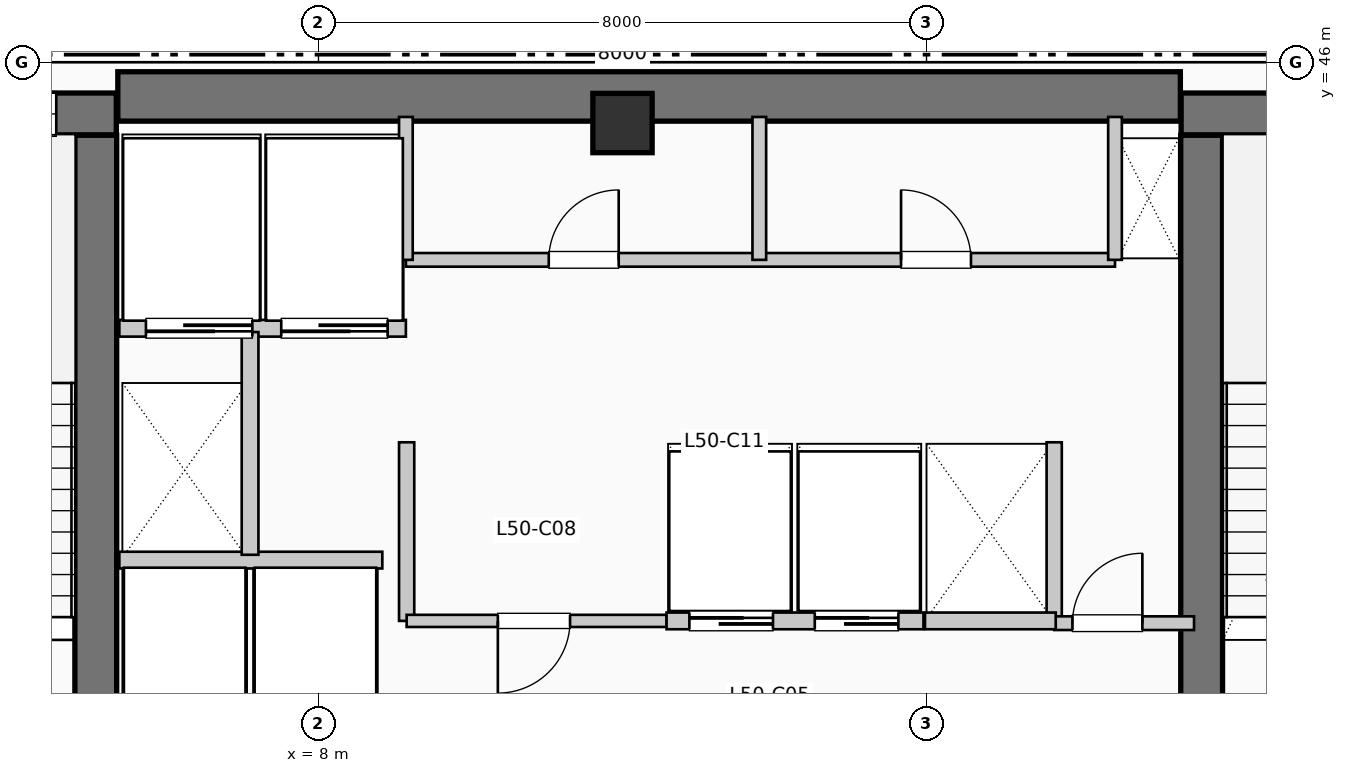
"""IFC4 building model, lengths in metres.
Left out: names, types, materials, properties, quantities, classifications, styles, units other than length and angle.
Written with IfcOpenShell. Run it as: python <this file> out.ifc"""

import sys

from ifc_helpers import new_model, si_unit, direction, frame, frame_2d, origin, origin_2d, place, context, subcontext, project, spatial, rectangle, extrude, element, fill, save


model = new_model("IFC4")
c1 = context("Model", 3, precision=1e-05, world=origin(), true_north=direction((0.0, 1.0)))
c2 = subcontext(c1, "Body", "Model", "MODEL_VIEW")
j1 = project(units=[si_unit("LENGTHUNIT", "METRE"), si_unit("PLANEANGLEUNIT", "RADIAN")], contexts=[c1])
p1 = place(None, origin())
s1 = spatial("IfcSite", under=j1, at=p1, CompositionType="ELEMENT")
p2 = place(p1, origin())
s2 = spatial("IfcBuilding", under=s1, at=p2, CompositionType="ELEMENT")
p3 = place(p2, frame((0.0, 0.0, 207.24)))
s3 = spatial("IfcBuildingStorey", under=s2, at=p3, CompositionType="ELEMENT", Elevation=207.24)
p4 = place(p3, frame((5.36, 45.55, 0.0), z_axis=(0.0, 0.0, 1.0), x_axis=(1.0, 0.0, 0.0)))
e1 = element("IfcWall", 1, at=p4, inside=s3, PredefinedType="SHEAR", context=c2, shape_type="SweptSolid", body=[
    extrude(rectangle(XDim=13.98, YDim=0.65, at=frame_2d((6.99, 0.0))), origin(), (0.0, 0.0, 1.0), 3.96),
])
p5 = place(p3, frame((5.07, 37.15, 0.0), z_axis=(0.0, 0.0, 1.0), x_axis=(0.0, 1.0, 0.0)))
e2 = element("IfcWall", 2, at=p5, inside=s3, PredefinedType="SHEAR", context=c2, shape_type="SweptSolid", body=[
    extrude(rectangle(XDim=7.89, YDim=0.55, at=frame_2d((3.945, 0.0))), origin(), (0.0, 0.0, 1.0), 3.96),
])
p6 = place(p3, frame((1.1, 45.32, 0.0), z_axis=(0.0, 0.0, 1.0), x_axis=(1.0, 0.0, 0.0)))
e3 = element("IfcWall", 3, at=p6, inside=s3, PredefinedType="SHEAR", context=c2, shape_type="SweptSolid", body=[
    extrude(rectangle(XDim=4.24, YDim=0.55, at=frame_2d((2.12, 0.0))), origin(), (0.0, 0.0, 1.0), 3.96),
])
p7 = place(p6, frame((2.05, 0.0, 1.05)))
e4 = element("IfcOpeningElement", 4, at=p7, cuts=e3, PredefinedType="OPENING", context=c2, shape_type="SweptSolid", body=[
    extrude(rectangle(XDim=1.4, YDim=1.8, at=frame_2d((0.7, 0.9))), frame((0.0, 0.285, 0.0), z_axis=(0.0, -1.0, 0.0), x_axis=(1.0, 0.0, 0.0)), (0.0, 0.0, 1.0), 0.57),
])
p8 = place(p3, frame((19.62, 37.15, 0.0), z_axis=(0.0, 0.0, 1.0), x_axis=(0.0, 1.0, 0.0)))
e5 = element("IfcWall", 5, at=p8, inside=s3, PredefinedType="SHEAR", context=c2, shape_type="SweptSolid", body=[
    extrude(rectangle(XDim=7.89, YDim=0.55, at=frame_2d((3.945, 0.0))), origin(), (0.0, 0.0, 1.0), 3.96),
])
p9 = place(p3, frame((19.35, 45.32, 0.0), z_axis=(0.0, 0.0, 1.0), x_axis=(1.0, 0.0, 0.0)))
e6 = element("IfcWall", 6, at=p9, inside=s3, PredefinedType="SHEAR", context=c2, shape_type="SweptSolid", body=[
    extrude(rectangle(XDim=3.69, YDim=0.55, at=frame_2d((1.845, 0.0))), origin(), (0.0, 0.0, 1.0), 3.96),
])
p10 = place(p9, frame((1.15, 0.0, 1.05)))
e7 = element("IfcOpeningElement", 7, at=p10, cuts=e6, PredefinedType="OPENING", context=c2, shape_type="SweptSolid", body=[
    extrude(rectangle(XDim=1.4, YDim=1.8, at=frame_2d((0.7, 0.9))), frame((0.0, 0.285, 0.0), z_axis=(0.0, -1.0, 0.0), x_axis=(1.0, 0.0, 0.0)), (0.0, 0.0, 1.0), 0.57),
])
p11 = place(p3, frame((12.0, 45.2, 0.0), z_axis=(0.0, 0.0, 1.0), x_axis=(1.0, 0.0, 0.0)))
e8 = element("IfcColumn", 8, at=p11, inside=s3, PredefinedType="COLUMN", context=c2, shape_type="SweptSolid", body=[
    extrude(rectangle(XDim=0.78, YDim=0.78, at=origin_2d()), origin(), (0.0, 0.0, 1.0), 3.96),
])
p12 = place(p3, frame((5.38, 39.45, 0.0), z_axis=(0.0, 0.0, 1.0), x_axis=(1.0, 0.0, 0.0)))
e9 = element("IfcWall", 9, at=p12, inside=s3, PredefinedType="PARTITIONING", context=c2, shape_type="SweptSolid", body=[
    extrude(rectangle(XDim=3.46, YDim=0.22, at=frame_2d((1.73, 0.0))), origin(), (0.0, 0.0, 1.0), 3.71),
])
p13 = place(p3, frame((5.38, 42.5, 0.0), z_axis=(0.0, 0.0, 1.0), x_axis=(1.0, 0.0, 0.0)))
e10 = element("IfcWall", 10, at=p13, inside=s3, PredefinedType="PARTITIONING", context=c2, shape_type="SweptSolid", body=[
    extrude(rectangle(XDim=3.77, YDim=0.22, at=frame_2d((1.885, 0.0))), origin(), (0.0, 0.0, 1.0), 3.71),
])
p14 = place(p13, frame((1.75, 0.0, 0.0), z_axis=(0.0, 0.0, 1.0), x_axis=(-1.0, 0.0, 0.0)))
e11 = element("IfcOpeningElement", 11, at=p14, cuts=e10, PredefinedType="OPENING", context=c2, shape_type="SweptSolid", body=[
    extrude(rectangle(XDim=1.4, YDim=2.2, at=frame_2d((0.7, 1.1))), frame((0.0, 0.12, 0.0), z_axis=(0.0, -1.0, 0.0), x_axis=(1.0, 0.0, 0.0)), (0.0, 0.0, 1.0), 0.24),
])
p15 = place(p13, frame((3.53, 0.0, 0.0), z_axis=(0.0, 0.0, 1.0), x_axis=(-1.0, 0.0, 0.0)))
e12 = element("IfcOpeningElement", 12, at=p15, cuts=e10, PredefinedType="OPENING", context=c2, shape_type="SweptSolid", body=[
    extrude(rectangle(XDim=1.4, YDim=2.2, at=frame_2d((0.7, 1.1))), frame((0.0, 0.12, 0.0), z_axis=(0.0, -1.0, 0.0), x_axis=(1.0, 0.0, 0.0)), (0.0, 0.0, 1.0), 0.24),
])
p16 = place(p3, frame((7.1, 39.52, 0.0), z_axis=(0.0, 0.0, 1.0), x_axis=(0.0, 1.0, 0.0)))
e13 = element("IfcWall", 13, at=p16, inside=s3, PredefinedType="PARTITIONING", context=c2, shape_type="SweptSolid", body=[
    extrude(rectangle(XDim=2.93, YDim=0.22, at=frame_2d((1.465, 0.0))), origin(), (0.0, 0.0, 1.0), 3.71),
])
for number, where, z_axis, x_axis in (
    (14, (9.16, 38.65, 0.0), (0.0, 0.0, 1.0), (0.0, 1.0, 0.0)),
    (15, (17.68, 38.65, 0.0), (0.0, 0.0, 1.0), (0.0, 1.0, 0.0)),
):
    element("IfcWall", number, at=place(p3, frame(where, z_axis=z_axis, x_axis=x_axis)), inside=s3, PredefinedType="PARTITIONING", context=c2, shape_type="SweptSolid", body=[
        extrude(rectangle(XDim=2.35, YDim=0.2, at=frame_2d((1.175, 0.0))), origin(), (0.0, 0.0, 1.0), 3.71),
    ])
p17 = place(p3, frame((17.68, 38.62, 0.0), z_axis=(0.0, 0.0, 1.0), x_axis=(1.0, 0.0, 0.0)))
e16 = element("IfcWall", 16, at=p17, inside=s3, PredefinedType="PARTITIONING", context=c2, shape_type="SweptSolid", body=[
    extrude(rectangle(XDim=1.84, YDim=0.18, at=frame_2d((0.92, 0.0))), origin(), (0.0, 0.0, 1.0), 3.71),
])
p18 = place(p17, frame((0.24, 0.0, 0.0)))
e17 = element("IfcOpeningElement", 17, at=p18, cuts=e16, PredefinedType="OPENING", context=c2, shape_type="SweptSolid", body=[
    extrude(rectangle(XDim=0.92, YDim=2.1, at=frame_2d((0.46, 1.05))), frame((0.0, 0.1, 0.0), z_axis=(0.0, -1.0, 0.0), x_axis=(1.0, 0.0, 0.0)), (0.0, 0.0, 1.0), 0.2),
])
p19 = place(p3, frame((9.16, 38.65, 0.0), z_axis=(0.0, 0.0, 1.0), x_axis=(1.0, 0.0, 0.0)))
e18 = element("IfcWall", 18, at=p19, inside=s3, PredefinedType="PARTITIONING", context=c2, shape_type="SweptSolid", body=[
    extrude(rectangle(XDim=3.42, YDim=0.16, at=frame_2d((1.71, 0.0))), origin(), (0.0, 0.0, 1.0), 3.71),
])
p20 = place(p19, frame((2.15, 0.0, 0.0), z_axis=(0.0, 0.0, 1.0), x_axis=(-1.0, 0.0, 0.0)))
e19 = element("IfcOpeningElement", 19, at=p20, cuts=e18, PredefinedType="OPENING", context=c2, shape_type="SweptSolid", body=[
    extrude(rectangle(XDim=0.95, YDim=2.15, at=frame_2d((0.475, 1.075))), frame((0.0, 0.09, 0.0), z_axis=(0.0, -1.0, 0.0), x_axis=(1.0, 0.0, 0.0)), (0.0, 0.0, 1.0), 0.18),
])
p21 = place(p3, frame((12.58, 38.65, 0.0), z_axis=(0.0, 0.0, 1.0), x_axis=(1.0, 0.0, 0.0)))
e20 = element("IfcWall", 20, at=p21, inside=s3, PredefinedType="PARTITIONING", context=c2, shape_type="SweptSolid", body=[
    extrude(rectangle(XDim=3.38, YDim=0.22, at=frame_2d((1.69, 0.0))), origin(), (0.0, 0.0, 1.0), 3.71),
])
p22 = place(p21, frame((0.3, 0.0, 0.0)))
e21 = element("IfcOpeningElement", 21, at=p22, cuts=e20, PredefinedType="OPENING", context=c2, shape_type="SweptSolid", body=[
    extrude(rectangle(XDim=1.1, YDim=2.2, at=frame_2d((0.55, 1.1))), frame((0.0, 0.12, 0.0), z_axis=(0.0, -1.0, 0.0), x_axis=(1.0, 0.0, 0.0)), (0.0, 0.0, 1.0), 0.24),
])
p23 = place(p21, frame((1.95, 0.0, 0.0)))
e22 = element("IfcOpeningElement", 22, at=p23, cuts=e20, PredefinedType="OPENING", context=c2, shape_type="SweptSolid", body=[
    extrude(rectangle(XDim=1.1, YDim=2.2, at=frame_2d((0.55, 1.1))), frame((0.0, 0.12, 0.0), z_axis=(0.0, -1.0, 0.0), x_axis=(1.0, 0.0, 0.0)), (0.0, 0.0, 1.0), 0.24),
])
p24 = place(p3, frame((15.98, 38.65, 0.0), z_axis=(0.0, 0.0, 1.0), x_axis=(1.0, 0.0, 0.0)))
e23 = element("IfcWall", 23, at=p24, inside=s3, PredefinedType="PARTITIONING", context=c2, shape_type="SweptSolid", body=[
    extrude(rectangle(XDim=1.72, YDim=0.22, at=frame_2d((0.86, 0.0))), origin(), (0.0, 0.0, 1.0), 3.71),
])
p25 = place(p3, frame((9.15, 43.4, 0.0), z_axis=(0.0, 0.0, 1.0), x_axis=(1.0, 0.0, 0.0)))
e24 = element("IfcWall", 24, at=p25, inside=s3, PredefinedType="PLUMBINGWALL", context=c2, shape_type="SweptSolid", body=[
    extrude(rectangle(XDim=9.33, YDim=0.18, at=frame_2d((4.665, 0.0))), origin(), (0.0, 0.0, 1.0), 3.71),
])
p26 = place(p25, frame((1.88, 0.0, 0.0)))
e25 = element("IfcOpeningElement", 25, at=p26, cuts=e24, PredefinedType="OPENING", context=c2, shape_type="SweptSolid", body=[
    extrude(rectangle(XDim=0.92, YDim=2.1, at=frame_2d((0.46, 1.05))), frame((0.0, 0.1, 0.0), z_axis=(0.0, -1.0, 0.0), x_axis=(1.0, 0.0, 0.0)), (0.0, 0.0, 1.0), 0.2),
])
p27 = place(p25, frame((6.515, 0.0, 0.0)))
e26 = element("IfcOpeningElement", 26, at=p27, cuts=e24, PredefinedType="OPENING", context=c2, shape_type="SweptSolid", body=[
    extrude(rectangle(XDim=0.92, YDim=2.1, at=frame_2d((0.46, 1.05))), frame((0.0, 0.1, 0.0), z_axis=(0.0, -1.0, 0.0), x_axis=(1.0, 0.0, 0.0)), (0.0, 0.0, 1.0), 0.2),
])
for number, where, z_axis, x_axis in (
    (27, (9.15, 43.4, 0.0), (0.0, 0.0, 1.0), (0.0, 1.0, 0.0)),
    (28, (18.48, 43.4, 0.0), (0.0, 0.0, 1.0), (0.0, 1.0, 0.0)),
    (29, (13.8, 43.4, 0.0), (0.0, 0.0, 1.0), (0.0, 1.0, 0.0)),
):
    element("IfcWall", number, at=place(p3, frame(where, z_axis=z_axis, x_axis=x_axis)), inside=s3, PredefinedType="PLUMBINGWALL", context=c2, shape_type="SweptSolid", body=[
        extrude(rectangle(XDim=1.88, YDim=0.18, at=frame_2d((0.94, 0.0))), origin(), (0.0, 0.0, 1.0), 3.71),
    ])
p28 = place(p7, origin())
e30 = element("IfcWindow", 30, at=p28, inside=s3, PartitioningType="SINGLE_PANEL", PredefinedType="WINDOW", context=c2, shape_type="SweptSolid", body=[
    extrude(rectangle(XDim=1.4, YDim=1.8, at=frame_2d((0.7, 0.9))), frame((0.0, 0.03, 0.0), z_axis=(0.0, -1.0, 0.0), x_axis=(1.0, 0.0, 0.0)), (0.0, 0.0, 1.0), 0.06),
])
fill(e4, e30)
p29 = place(p14, origin())
e31 = element("IfcDoor", 31, at=p29, inside=s3, OperationType="SLIDING_TO_LEFT", PredefinedType="DOOR", context=c2, shape_type="SweptSolid", body=[
    extrude(rectangle(XDim=1.4, YDim=2.2, at=frame_2d((0.7, 1.1))), frame((0.0, 0.025, 0.0), z_axis=(0.0, -1.0, 0.0), x_axis=(1.0, 0.0, 0.0)), (0.0, 0.0, 1.0), 0.05),
])
fill(e11, e31)
p30 = place(p15, origin())
e32 = element("IfcDoor", 32, at=p30, inside=s3, OperationType="SLIDING_TO_LEFT", PredefinedType="DOOR", context=c2, shape_type="SweptSolid", body=[
    extrude(rectangle(XDim=1.4, YDim=2.2, at=frame_2d((0.7, 1.1))), frame((0.0, 0.025, 0.0), z_axis=(0.0, -1.0, 0.0), x_axis=(1.0, 0.0, 0.0)), (0.0, 0.0, 1.0), 0.05),
])
fill(e12, e32)
p31 = place(p18, origin())
e33 = element("IfcDoor", 33, at=p31, inside=s3, OperationType="SINGLE_SWING_RIGHT", PredefinedType="DOOR", context=c2, shape_type="SweptSolid", body=[
    extrude(rectangle(XDim=0.92, YDim=2.1, at=frame_2d((0.46, 1.05))), frame((0.0, 0.025, 0.0), z_axis=(0.0, -1.0, 0.0), x_axis=(1.0, 0.0, 0.0)), (0.0, 0.0, 1.0), 0.05),
])
fill(e17, e33)
p32 = place(p20, origin())
e34 = element("IfcDoor", 34, at=p32, inside=s3, OperationType="SINGLE_SWING_LEFT", PredefinedType="DOOR", context=c2, shape_type="SweptSolid", body=[
    extrude(rectangle(XDim=0.95, YDim=2.15, at=frame_2d((0.475, 1.075))), frame((0.0, 0.025, 0.0), z_axis=(0.0, -1.0, 0.0), x_axis=(1.0, 0.0, 0.0)), (0.0, 0.0, 1.0), 0.05),
])
fill(e19, e34)
p33 = place(p22, origin())
e35 = element("IfcDoor", 35, at=p33, inside=s3, OperationType="SLIDING_TO_RIGHT", PredefinedType="DOOR", context=c2, shape_type="SweptSolid", body=[
    extrude(rectangle(XDim=1.1, YDim=2.2, at=frame_2d((0.55, 1.1))), frame((0.0, 0.025, 0.0), z_axis=(0.0, -1.0, 0.0), x_axis=(1.0, 0.0, 0.0)), (0.0, 0.0, 1.0), 0.05),
])
fill(e21, e35)
p34 = place(p23, origin())
e36 = element("IfcDoor", 36, at=p34, inside=s3, OperationType="SLIDING_TO_RIGHT", PredefinedType="DOOR", context=c2, shape_type="SweptSolid", body=[
    extrude(rectangle(XDim=1.1, YDim=2.2, at=frame_2d((0.55, 1.1))), frame((0.0, 0.025, 0.0), z_axis=(0.0, -1.0, 0.0), x_axis=(1.0, 0.0, 0.0)), (0.0, 0.0, 1.0), 0.05),
])
fill(e22, e36)
p35 = place(p26, origin())
e37 = element("IfcDoor", 37, at=p35, inside=s3, OperationType="SINGLE_SWING_RIGHT", PredefinedType="DOOR", context=c2, shape_type="SweptSolid", body=[
    extrude(rectangle(XDim=0.92, YDim=2.1, at=frame_2d((0.46, 1.05))), frame((0.0, 0.025, 0.0), z_axis=(0.0, -1.0, 0.0), x_axis=(1.0, 0.0, 0.0)), (0.0, 0.0, 1.0), 0.05),
])
fill(e25, e37)
p36 = place(p27, origin())
e38 = element("IfcDoor", 38, at=p36, inside=s3, OperationType="SINGLE_SWING_LEFT", PredefinedType="DOOR", context=c2, shape_type="SweptSolid", body=[
    extrude(rectangle(XDim=0.92, YDim=2.1, at=frame_2d((0.46, 1.05))), frame((0.0, 0.025, 0.0), z_axis=(0.0, -1.0, 0.0), x_axis=(1.0, 0.0, 0.0)), (0.0, 0.0, 1.0), 0.05),
])
fill(e26, e38)
save(model, sys.argv[1])
